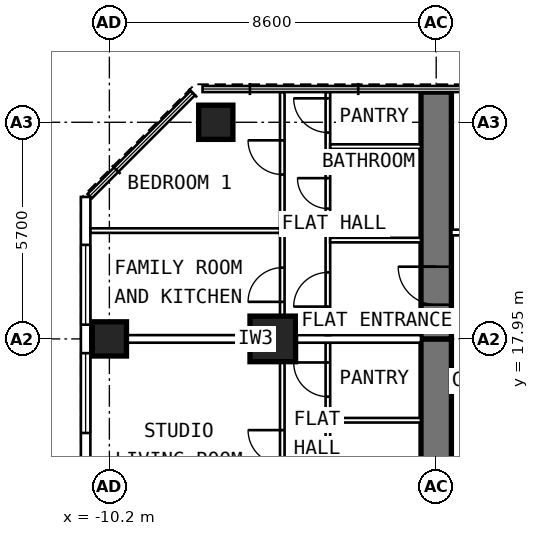
"""IFC4 building model, lengths in metres.
Left out: names, types, materials, properties, quantities, classifications, styles, units other than length and angle.
Written with IfcOpenShell. Run it as: python <this file> out.ifc"""

import sys

from ifc_helpers import new_model, si_unit, direction, frame, frame_2d, origin, origin_2d, place, context, subcontext, project, spatial, rectangle, extrude, element, fill, save


model = new_model("IFC4")
c1 = context("Model", 3, precision=1e-05, world=origin(), true_north=direction((0.0, 1.0)))
c2 = subcontext(c1, "Body", "Model", "MODEL_VIEW")
j1 = project(units=[si_unit("LENGTHUNIT", "METRE"), si_unit("PLANEANGLEUNIT", "RADIAN")], contexts=[c1])
p1 = place(None, origin())
s1 = spatial("IfcSite", under=j1, at=p1, CompositionType="ELEMENT")
p2 = place(p1, origin())
s2 = spatial("IfcBuilding", under=s1, at=p2, CompositionType="ELEMENT")
p3 = place(p2, frame((0.0, 0.0, 131.0)))
s3 = spatial("IfcBuildingStorey", under=s2, at=p3, CompositionType="ELEMENT", Elevation=131.0)
for number, where, z_axis, x_axis in (
    (1, (-10.2, 17.95, 0.0), (0.0, 0.0, 1.0), (0.0, 1.0, 0.0)),
    (2, (-7.4, 23.65, 0.0), (0.0, 0.0, 1.0), (0.0, 1.0, 0.0)),
):
    element("IfcColumn", number, at=place(p3, frame(where, z_axis=z_axis, x_axis=x_axis)), inside=s3, PredefinedType="COLUMN", context=c2, shape_type="SweptSolid", body=[
        extrude(rectangle(XDim=0.9, YDim=0.9, at=origin_2d()), origin(), (0.0, 0.0, 1.0), 3.6),
    ])
p4 = place(p3, frame((-5.9, 17.95, 0.0), z_axis=(0.0, 0.0, 1.0), x_axis=(0.0, 1.0, 0.0)))
e3 = element("IfcColumn", 3, at=p4, inside=s3, PredefinedType="COLUMN", context=c2, shape_type="SweptSolid", body=[
    extrude(rectangle(XDim=1.2, YDim=1.2, at=origin_2d()), origin(), (0.0, 0.0, 1.0), 3.6),
])
p5 = place(p3, frame((-1.6, 9.6, 0.0), z_axis=(0.0, 0.0, 1.0), x_axis=(0.0, 1.0, 0.0)))
e4 = element("IfcWall", 4, at=p5, inside=s3, PredefinedType="SHEAR", context=c2, shape_type="SweptSolid", body=[
    extrude(rectangle(XDim=8.35, YDim=0.8, at=frame_2d((4.175, 0.0))), origin(), (0.0, 0.0, 1.0), 3.6),
])
p6 = place(p5, frame((1.3, 0.0, 0.0)))
e5 = element("IfcOpeningElement", 5, at=p6, cuts=e4, PredefinedType="OPENING", context=c2, shape_type="SweptSolid", body=[
    extrude(rectangle(XDim=1.0, YDim=2.1, at=frame_2d((0.5, 1.05))), frame((0.0, 0.412, 0.0), z_axis=(0.0, -1.0, 0.0), x_axis=(1.0, 0.0, 0.0)), (0.0, 0.0, 1.0), 0.824),
])
p7 = place(p3, frame((-1.6, 17.95, 0.0), z_axis=(0.0, 0.0, 1.0), x_axis=(0.0, 1.0, 0.0)))
e6 = element("IfcWall", 6, at=p7, inside=s3, PredefinedType="SHEAR", context=c2, shape_type="SweptSolid", body=[
    extrude(rectangle(XDim=6.495, YDim=0.8, at=frame_2d((3.248, 0.0))), origin(), (0.0, 0.0, 1.0), 3.6),
])
p8 = place(p7, frame((0.9, 0.0, 0.0)))
e7 = element("IfcOpeningElement", 7, at=p8, cuts=e6, PredefinedType="OPENING", context=c2, shape_type="SweptSolid", body=[
    extrude(rectangle(XDim=1.0, YDim=2.1, at=frame_2d((0.5, 1.05))), frame((0.0, 0.412, 0.0), z_axis=(0.0, -1.0, 0.0), x_axis=(1.0, 0.0, 0.0)), (0.0, 0.0, 1.0), 0.824),
])
p9 = place(p3, frame((-10.825, 6.148, 0.0), z_axis=(0.0, 0.0, 1.0), x_axis=(0.0, 1.0, 0.0)))
e8 = element("IfcWall", 8, at=p9, inside=s3, PredefinedType="SOLIDWALL", context=c2, shape_type="SweptSolid", body=[
    extrude(rectangle(XDim=15.537, YDim=0.25, at=frame_2d((7.769, 0.0))), origin(), (0.0, 0.0, 1.0), 3.35),
])
p10 = place(p9, frame((0.777, 0.0, 0.8)))
e9 = element("IfcOpeningElement", 9, at=p10, cuts=e8, PredefinedType="OPENING", context=c2, shape_type="SweptSolid", body=[
    extrude(rectangle(XDim=2.1, YDim=1.8, at=frame_2d((1.05, 0.9))), frame((0.0, 0.137, 0.0), z_axis=(0.0, -1.0, 0.0), x_axis=(1.0, 0.0, 0.0)), (0.0, 0.0, 1.0), 0.274),
])
p11 = place(p9, frame((3.627, 0.0, 0.8)))
e10 = element("IfcOpeningElement", 10, at=p11, cuts=e8, PredefinedType="OPENING", context=c2, shape_type="SweptSolid", body=[
    extrude(rectangle(XDim=2.1, YDim=1.8, at=frame_2d((1.05, 0.9))), frame((0.0, 0.137, 0.0), z_axis=(0.0, -1.0, 0.0), x_axis=(1.0, 0.0, 0.0)), (0.0, 0.0, 1.0), 0.274),
])
p12 = place(p9, frame((6.477, 0.0, 0.8)))
e11 = element("IfcOpeningElement", 11, at=p12, cuts=e8, PredefinedType="OPENING", context=c2, shape_type="SweptSolid", body=[
    extrude(rectangle(XDim=2.1, YDim=1.8, at=frame_2d((1.05, 0.9))), frame((0.0, 0.137, 0.0), z_axis=(0.0, -1.0, 0.0), x_axis=(1.0, 0.0, 0.0)), (0.0, 0.0, 1.0), 0.274),
])
p13 = place(p9, frame((9.327, 0.0, 0.8)))
e12 = element("IfcOpeningElement", 12, at=p13, cuts=e8, PredefinedType="OPENING", context=c2, shape_type="SweptSolid", body=[
    extrude(rectangle(XDim=2.1, YDim=1.8, at=frame_2d((1.05, 0.9))), frame((0.0, 0.137, 0.0), z_axis=(0.0, -1.0, 0.0), x_axis=(1.0, 0.0, 0.0)), (0.0, 0.0, 1.0), 0.274),
])
p14 = place(p9, frame((12.177, 0.0, 0.8)))
e13 = element("IfcOpeningElement", 13, at=p14, cuts=e8, PredefinedType="OPENING", context=c2, shape_type="SweptSolid", body=[
    extrude(rectangle(XDim=2.1, YDim=1.8, at=frame_2d((1.05, 0.9))), frame((0.0, 0.137, 0.0), z_axis=(0.0, -1.0, 0.0), x_axis=(1.0, 0.0, 0.0)), (0.0, 0.0, 1.0), 0.274),
])
p15 = place(p3, frame((-4.45, 10.05, 0.0), z_axis=(0.0, 0.0, 1.0), x_axis=(0.0, 1.0, 0.0)))
e14 = element("IfcWall", 14, at=p15, inside=s3, PredefinedType="PARTITIONING", context=c2, shape_type="SweptSolid", body=[
    extrude(rectangle(XDim=7.8, YDim=0.12, at=frame_2d((3.9, 0.0))), origin(), (0.0, 0.0, 1.0), 3.35),
])
p16 = place(p15, frame((0.8, 0.0, 0.0)))
e15 = element("IfcOpeningElement", 15, at=p16, cuts=e14, PredefinedType="OPENING", context=c2, shape_type="SweptSolid", body=[
    extrude(rectangle(XDim=0.9, YDim=2.1, at=frame_2d((0.45, 1.05))), frame((0.0, 0.072, 0.0), z_axis=(0.0, -1.0, 0.0), x_axis=(1.0, 0.0, 0.0)), (0.0, 0.0, 1.0), 0.144),
])
p17 = place(p15, frame((3.755, 0.0, 0.0)))
e16 = element("IfcOpeningElement", 16, at=p17, cuts=e14, PredefinedType="OPENING", context=c2, shape_type="SweptSolid", body=[
    extrude(rectangle(XDim=0.8, YDim=2.1, at=frame_2d((0.4, 1.05))), frame((0.0, 0.072, 0.0), z_axis=(0.0, -1.0, 0.0), x_axis=(1.0, 0.0, 0.0)), (0.0, 0.0, 1.0), 0.144),
])
p18 = place(p15, frame((6.38, 0.0, 0.0)))
e17 = element("IfcOpeningElement", 17, at=p18, cuts=e14, PredefinedType="OPENING", context=c2, shape_type="SweptSolid", body=[
    extrude(rectangle(XDim=0.9, YDim=2.1, at=frame_2d((0.45, 1.05))), frame((0.0, 0.072, 0.0), z_axis=(0.0, -1.0, 0.0), x_axis=(1.0, 0.0, 0.0)), (0.0, 0.0, 1.0), 0.144),
])
p19 = place(p3, frame((-5.65, 9.6, 0.0), z_axis=(0.0, 0.0, 1.0), x_axis=(0.0, 1.0, 0.0)))
e18 = element("IfcWall", 18, at=p19, inside=s3, PredefinedType="PARTITIONING", context=c2, shape_type="SweptSolid", body=[
    extrude(rectangle(XDim=8.1, YDim=0.12, at=frame_2d((4.05, 0.0))), origin(), (0.0, 0.0, 1.0), 3.35),
])
p20 = place(p19, frame((5.05, 0.0, 0.0)))
e19 = element("IfcOpeningElement", 19, at=p20, cuts=e18, PredefinedType="OPENING", context=c2, shape_type="SweptSolid", body=[
    extrude(rectangle(XDim=0.9, YDim=2.1, at=frame_2d((0.45, 1.05))), frame((0.0, 0.072, 0.0), z_axis=(0.0, -1.0, 0.0), x_axis=(1.0, 0.0, 0.0)), (0.0, 0.0, 1.0), 0.144),
])
p21 = place(p3, frame((-2.0, 15.81, 0.0), z_axis=(0.0, 0.0, 1.0), x_axis=(-1.0, 0.0, 0.0)))
e20 = element("IfcWall", 20, at=p21, inside=s3, PredefinedType="PARTITIONING", context=c2, shape_type="SweptSolid", body=[
    extrude(rectangle(XDim=2.39, YDim=0.12, at=frame_2d((1.195, 0.0))), origin(), (0.0, 0.0, 1.0), 3.35),
])
p22 = place(p3, frame((-4.45, 18.05, 0.0), z_axis=(0.0, 0.0, 1.0), x_axis=(0.0, 1.0, 0.0)))
e21 = element("IfcWall", 21, at=p22, inside=s3, PredefinedType="PARTITIONING", context=c2, shape_type="SweptSolid", body=[
    extrude(rectangle(XDim=6.395, YDim=0.12, at=frame_2d((3.198, 0.0))), origin(), (0.0, 0.0, 1.0), 3.35),
])
p23 = place(p22, frame((0.75, 0.0, 0.0)))
e22 = element("IfcOpeningElement", 22, at=p23, cuts=e21, PredefinedType="OPENING", context=c2, shape_type="SweptSolid", body=[
    extrude(rectangle(XDim=0.9, YDim=2.1, at=frame_2d((0.45, 1.05))), frame((0.0, 0.072, 0.0), z_axis=(0.0, -1.0, 0.0), x_axis=(1.0, 0.0, 0.0)), (0.0, 0.0, 1.0), 0.144),
])
p24 = place(p22, frame((3.33, 0.0, 0.0)))
e23 = element("IfcOpeningElement", 23, at=p24, cuts=e21, PredefinedType="OPENING", context=c2, shape_type="SweptSolid", body=[
    extrude(rectangle(XDim=0.8, YDim=2.1, at=frame_2d((0.4, 1.05))), frame((0.0, 0.072, 0.0), z_axis=(0.0, -1.0, 0.0), x_axis=(1.0, 0.0, 0.0)), (0.0, 0.0, 1.0), 0.144),
])
p25 = place(p22, frame((5.33, 0.0, 0.0)))
e24 = element("IfcOpeningElement", 24, at=p25, cuts=e21, PredefinedType="OPENING", context=c2, shape_type="SweptSolid", body=[
    extrude(rectangle(XDim=0.9, YDim=2.1, at=frame_2d((0.45, 1.05))), frame((0.0, 0.072, 0.0), z_axis=(0.0, -1.0, 0.0), x_axis=(1.0, 0.0, 0.0)), (0.0, 0.0, 1.0), 0.144),
])
p26 = place(p3, frame((-5.65, 18.05, 0.0), z_axis=(0.0, 0.0, 1.0), x_axis=(0.0, 1.0, 0.0)))
e25 = element("IfcWall", 25, at=p26, inside=s3, PredefinedType="PARTITIONING", context=c2, shape_type="SweptSolid", body=[
    extrude(rectangle(XDim=6.395, YDim=0.12, at=frame_2d((3.198, 0.0))), origin(), (0.0, 0.0, 1.0), 3.35),
])
p27 = place(p26, frame((0.875, 0.0, 0.0)))
e26 = element("IfcOpeningElement", 26, at=p27, cuts=e25, PredefinedType="OPENING", context=c2, shape_type="SweptSolid", body=[
    extrude(rectangle(XDim=0.9, YDim=2.1, at=frame_2d((0.45, 1.05))), frame((0.0, 0.072, 0.0), z_axis=(0.0, -1.0, 0.0), x_axis=(1.0, 0.0, 0.0)), (0.0, 0.0, 1.0), 0.144),
])
p28 = place(p26, frame((4.225, 0.0, 0.0)))
e27 = element("IfcOpeningElement", 27, at=p28, cuts=e25, PredefinedType="OPENING", context=c2, shape_type="SweptSolid", body=[
    extrude(rectangle(XDim=0.9, YDim=2.1, at=frame_2d((0.45, 1.05))), frame((0.0, 0.072, 0.0), z_axis=(0.0, -1.0, 0.0), x_axis=(1.0, 0.0, 0.0)), (0.0, 0.0, 1.0), 0.144),
])
p29 = place(p3, frame((-5.71, 20.8, 0.0), z_axis=(0.0, 0.0, 1.0), x_axis=(-1.0, 0.0, 0.0)))
e28 = element("IfcWall", 28, at=p29, inside=s3, PredefinedType="PARTITIONING", context=c2, shape_type="SweptSolid", body=[
    extrude(rectangle(XDim=4.99, YDim=0.12, at=frame_2d((2.495, 0.0))), origin(), (0.0, 0.0, 1.0), 3.35),
])
for number, where, z_axis, x_axis in (
    (29, (-2.0, 20.55, 0.0), (0.0, 0.0, 1.0), (-1.0, 0.0, 0.0)),
    (30, (-2.0, 23.01, 0.0), (0.0, 0.0, 1.0), (-1.0, 0.0, 0.0)),
):
    element("IfcWall", number, at=place(p3, frame(where, z_axis=z_axis, x_axis=x_axis)), inside=s3, PredefinedType="PARTITIONING", context=c2, shape_type="SweptSolid", body=[
        extrude(rectangle(XDim=2.39, YDim=0.12, at=frame_2d((1.195, 0.0))), origin(), (0.0, 0.0, 1.0), 3.35),
    ])
p30 = place(p3, frame((-2.0, 17.95, 0.0), z_axis=(0.0, 0.0, 1.0), x_axis=(-1.0, 0.0, 0.0)))
e31 = element("IfcWall", 31, at=p30, inside=s3, PredefinedType="PARTITIONING", context=c2, shape_type="SweptSolid", body=[
    extrude(rectangle(XDim=8.7, YDim=0.2, at=frame_2d((4.35, 0.0))), origin(), (0.0, 0.0, 1.0), 2.45),
])
p31 = place(p3, frame((1.2, 20.75, 0.0), z_axis=(0.0, 0.0, 1.0), x_axis=(-1.0, 0.0, 0.0)))
e32 = element("IfcWall", 32, at=p31, inside=s3, PredefinedType="PARTITIONING", context=c2, shape_type="SweptSolid", body=[
    extrude(rectangle(XDim=2.4, YDim=0.15, at=frame_2d((1.2, 0.0))), origin(), (0.0, 0.0, 1.0), 3.35),
])
p32 = place(p31, frame((0.7, 0.0, 0.0)))
e33 = element("IfcOpeningElement", 33, at=p32, cuts=e32, PredefinedType="OPENING", context=c2, shape_type="SweptSolid", body=[
    extrude(rectangle(XDim=1.0, YDim=2.1, at=frame_2d((0.5, 1.05))), frame((0.0, 0.087, 0.0), z_axis=(0.0, -1.0, 0.0), x_axis=(1.0, 0.0, 0.0)), (0.0, 0.0, 1.0), 0.174),
])
p33 = place(p13, origin())
e34 = element("IfcWindow", 34, at=p33, inside=s3, PartitioningType="SINGLE_PANEL", PredefinedType="WINDOW", context=c2, shape_type="SweptSolid", body=[
    extrude(rectangle(XDim=2.1, YDim=1.8, at=frame_2d((1.05, 0.9))), frame((0.0, 0.03, 0.0), z_axis=(0.0, -1.0, 0.0), x_axis=(1.0, 0.0, 0.0)), (0.0, 0.0, 1.0), 0.06),
])
fill(e12, e34)
p34 = place(p14, origin())
e35 = element("IfcWindow", 35, at=p34, inside=s3, PartitioningType="SINGLE_PANEL", PredefinedType="WINDOW", context=c2, shape_type="SweptSolid", body=[
    extrude(rectangle(XDim=2.1, YDim=1.8, at=frame_2d((1.05, 0.9))), frame((0.0, 0.03, 0.0), z_axis=(0.0, -1.0, 0.0), x_axis=(1.0, 0.0, 0.0)), (0.0, 0.0, 1.0), 0.06),
])
fill(e13, e35)
p35 = place(p20, origin())
e36 = element("IfcDoor", 36, at=p35, inside=s3, OperationType="SINGLE_SWING_RIGHT", PredefinedType="DOOR", context=c2, shape_type="SweptSolid", body=[
    extrude(rectangle(XDim=0.9, YDim=2.1, at=frame_2d((0.45, 1.05))), frame((0.0, 0.025, 0.0), z_axis=(0.0, -1.0, 0.0), x_axis=(1.0, 0.0, 0.0)), (0.0, 0.0, 1.0), 0.05),
])
fill(e19, e36)
p36 = place(p18, origin())
e37 = element("IfcDoor", 37, at=p36, inside=s3, OperationType="SINGLE_SWING_RIGHT", PredefinedType="DOOR", context=c2, shape_type="SweptSolid", body=[
    extrude(rectangle(XDim=0.9, YDim=2.1, at=frame_2d((0.45, 1.05))), frame((0.0, 0.025, 0.0), z_axis=(0.0, -1.0, 0.0), x_axis=(1.0, 0.0, 0.0)), (0.0, 0.0, 1.0), 0.05),
])
fill(e17, e37)
p37 = place(p8, origin())
e38 = element("IfcDoor", 38, at=p37, inside=s3, OperationType="SINGLE_SWING_RIGHT", PredefinedType="DOOR", context=c2, shape_type="SweptSolid", body=[
    extrude(rectangle(XDim=1.0, YDim=2.1, at=frame_2d((0.5, 1.05))), frame((0.0, 0.15, 0.0), z_axis=(0.0, -1.0, 0.0), x_axis=(1.0, 0.0, 0.0)), (0.0, 0.0, 1.0), 0.3),
])
fill(e7, e38)
p38 = place(p27, origin())
e39 = element("IfcDoor", 39, at=p38, inside=s3, OperationType="SINGLE_SWING_LEFT", PredefinedType="DOOR", context=c2, shape_type="SweptSolid", body=[
    extrude(rectangle(XDim=0.9, YDim=2.1, at=frame_2d((0.45, 1.05))), frame((0.0, 0.025, 0.0), z_axis=(0.0, -1.0, 0.0), x_axis=(1.0, 0.0, 0.0)), (0.0, 0.0, 1.0), 0.05),
])
fill(e26, e39)
p39 = place(p28, origin())
e40 = element("IfcDoor", 40, at=p39, inside=s3, OperationType="SINGLE_SWING_RIGHT", PredefinedType="DOOR", context=c2, shape_type="SweptSolid", body=[
    extrude(rectangle(XDim=0.9, YDim=2.1, at=frame_2d((0.45, 1.05))), frame((0.0, 0.025, 0.0), z_axis=(0.0, -1.0, 0.0), x_axis=(1.0, 0.0, 0.0)), (0.0, 0.0, 1.0), 0.05),
])
fill(e27, e40)
p40 = place(p23, origin())
e41 = element("IfcDoor", 41, at=p40, inside=s3, OperationType="SINGLE_SWING_LEFT", PredefinedType="DOOR", context=c2, shape_type="SweptSolid", body=[
    extrude(rectangle(XDim=0.9, YDim=2.1, at=frame_2d((0.45, 1.05))), frame((0.0, 0.025, 0.0), z_axis=(0.0, -1.0, 0.0), x_axis=(1.0, 0.0, 0.0)), (0.0, 0.0, 1.0), 0.05),
])
fill(e22, e41)
p41 = place(p24, origin())
e42 = element("IfcDoor", 42, at=p41, inside=s3, OperationType="SINGLE_SWING_RIGHT", PredefinedType="DOOR", context=c2, shape_type="SweptSolid", body=[
    extrude(rectangle(XDim=0.8, YDim=2.1, at=frame_2d((0.4, 1.05))), frame((0.0, 0.025, 0.0), z_axis=(0.0, -1.0, 0.0), x_axis=(1.0, 0.0, 0.0)), (0.0, 0.0, 1.0), 0.05),
])
fill(e23, e42)
p42 = place(p25, origin())
e43 = element("IfcDoor", 43, at=p42, inside=s3, OperationType="SINGLE_SWING_RIGHT", PredefinedType="DOOR", context=c2, shape_type="SweptSolid", body=[
    extrude(rectangle(XDim=0.9, YDim=2.1, at=frame_2d((0.45, 1.05))), frame((0.0, 0.025, 0.0), z_axis=(0.0, -1.0, 0.0), x_axis=(1.0, 0.0, 0.0)), (0.0, 0.0, 1.0), 0.05),
])
fill(e24, e43)
save(model, sys.argv[1])
